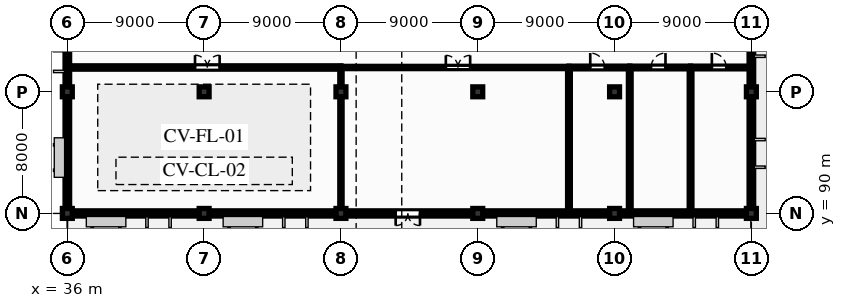
"""IFC4 building model, lengths in metres.
Left out: names, types, materials, properties, quantities, classifications, styles, units other than length and angle.
Written with IfcOpenShell. Run it as: python <this file> out.ifc"""

import sys

from ifc_helpers import new_model, si_unit, direction, frame, frame_2d, origin, origin_2d, place, context, subcontext, project, spatial, rectangle, extrude, element, fill, save


model = new_model("IFC4")
c1 = context("Model", 3, precision=1e-05, world=origin(), true_north=direction((0.0, 1.0)))
c2 = subcontext(c1, "Body", "Model", "MODEL_VIEW")
j1 = project(units=[si_unit("LENGTHUNIT", "METRE"), si_unit("PLANEANGLEUNIT", "RADIAN")], contexts=[c1])
p1 = place(None, origin())
s1 = spatial("IfcSite", under=j1, at=p1, CompositionType="ELEMENT")
p2 = place(p1, origin())
s2 = spatial("IfcBuilding", under=s1, at=p2, CompositionType="ELEMENT")
p3 = place(p2, frame((0.0, 0.0, 16.52)))
s3 = spatial("IfcBuildingStorey", under=s2, at=p3, CompositionType="ELEMENT", Elevation=16.52)
for number, where, z_axis, x_axis in (
    (1, (36.0, 90.0, 0.0), (0.0, 0.0, 1.0), (1.0, 0.0, 0.0)),
    (2, (36.0, 98.0, 0.0), (0.0, 0.0, 1.0), (1.0, 0.0, 0.0)),
    (3, (45.0, 90.0, 0.0), (0.0, 0.0, 1.0), (1.0, 0.0, 0.0)),
    (4, (45.0, 98.0, 0.0), (0.0, 0.0, 1.0), (1.0, 0.0, 0.0)),
    (5, (54.0, 90.0, 0.0), (0.0, 0.0, 1.0), (1.0, 0.0, 0.0)),
    (6, (54.0, 98.0, 0.0), (0.0, 0.0, 1.0), (1.0, 0.0, 0.0)),
    (7, (63.0, 90.0, 0.0), (0.0, 0.0, 1.0), (1.0, 0.0, 0.0)),
    (8, (63.0, 98.0, 0.0), (0.0, 0.0, 1.0), (1.0, 0.0, 0.0)),
    (9, (72.0, 90.0, 0.0), (0.0, 0.0, 1.0), (1.0, 0.0, 0.0)),
    (10, (72.0, 98.0, 0.0), (0.0, 0.0, 1.0), (1.0, 0.0, 0.0)),
    (11, (81.0, 90.0, 0.0), (0.0, 0.0, 1.0), (1.0, 0.0, 0.0)),
    (12, (81.0, 98.0, 0.0), (0.0, 0.0, 1.0), (1.0, 0.0, 0.0)),
):
    element("IfcColumn", number, at=place(p3, frame(where, z_axis=z_axis, x_axis=x_axis)), inside=s3, PredefinedType="COLUMN", context=c2, shape_type="SweptSolid", body=[
        extrude(rectangle(XDim=0.65, YDim=0.65, at=origin_2d()), origin(), (0.0, 0.0, 1.0), 3.74),
    ])
p4 = place(p3, frame((36.0, 90.0, 0.0), z_axis=(0.0, 0.0, 1.0), x_axis=(1.0, 0.0, 0.0)))
e13 = element("IfcWall", 13, at=p4, inside=s3, PredefinedType="SOLIDWALL", context=c2, shape_type="SweptSolid", body=[
    extrude(rectangle(XDim=9.0, YDim=0.34, at=frame_2d((4.5, 0.0))), origin(), (0.0, 0.0, 1.0), 3.46),
])
p5 = place(p4, frame((1.8, 0.0, 0.645)))
e14 = element("IfcOpeningElement", 14, at=p5, cuts=e13, PredefinedType="OPENING", context=c2, shape_type="SweptSolid", body=[
    extrude(rectangle(XDim=1.5, YDim=2.1, at=frame_2d((0.75, 1.05))), frame((0.0, 0.18, 0.0), z_axis=(0.0, -1.0, 0.0), x_axis=(1.0, 0.0, 0.0)), (0.0, 0.0, 1.0), 0.36),
])
p6 = place(p4, frame((5.4, 0.0, 0.645)))
e15 = element("IfcOpeningElement", 15, at=p6, cuts=e13, PredefinedType="OPENING", context=c2, shape_type="SweptSolid", body=[
    extrude(rectangle(XDim=1.2, YDim=2.1, at=frame_2d((0.6, 1.05))), frame((0.0, 0.18, 0.0), z_axis=(0.0, -1.0, 0.0), x_axis=(1.0, 0.0, 0.0)), (0.0, 0.0, 1.0), 0.36),
])
p7 = place(p3, frame((45.0, 90.0, 0.0), z_axis=(0.0, 0.0, 1.0), x_axis=(1.0, 0.0, 0.0)))
e16 = element("IfcWall", 16, at=p7, inside=s3, PredefinedType="SOLIDWALL", context=c2, shape_type="SweptSolid", body=[
    extrude(rectangle(XDim=9.0, YDim=0.34, at=frame_2d((4.5, 0.0))), origin(), (0.0, 0.0, 1.0), 3.46),
])
p8 = place(p7, frame((1.8, 0.0, 0.61)))
e17 = element("IfcOpeningElement", 17, at=p8, cuts=e16, PredefinedType="OPENING", context=c2, shape_type="SweptSolid", body=[
    extrude(rectangle(XDim=1.5, YDim=2.1, at=frame_2d((0.75, 1.05))), frame((0.0, 0.18, 0.0), z_axis=(0.0, -1.0, 0.0), x_axis=(1.0, 0.0, 0.0)), (0.0, 0.0, 1.0), 0.36),
])
p9 = place(p7, frame((5.4, 0.0, 0.61)))
e18 = element("IfcOpeningElement", 18, at=p9, cuts=e16, PredefinedType="OPENING", context=c2, shape_type="SweptSolid", body=[
    extrude(rectangle(XDim=1.2, YDim=2.1, at=frame_2d((0.6, 1.05))), frame((0.0, 0.18, 0.0), z_axis=(0.0, -1.0, 0.0), x_axis=(1.0, 0.0, 0.0)), (0.0, 0.0, 1.0), 0.36),
])
p10 = place(p3, frame((54.0, 90.0, 0.0), z_axis=(0.0, 0.0, 1.0), x_axis=(1.0, 0.0, 0.0)))
e19 = element("IfcWall", 19, at=p10, inside=s3, PredefinedType="SOLIDWALL", context=c2, shape_type="SweptSolid", body=[
    extrude(rectangle(XDim=9.0, YDim=0.34, at=frame_2d((4.5, 0.0))), origin(), (0.0, 0.0, 1.0), 3.46),
])
p11 = place(p10, frame((3.6, 0.0, 0.0)))
e20 = element("IfcOpeningElement", 20, at=p11, cuts=e19, PredefinedType="OPENING", context=c2, shape_type="SweptSolid", body=[
    extrude(rectangle(XDim=1.6, YDim=2.25, at=frame_2d((0.8, 1.125))), frame((0.0, 0.18, 0.0), z_axis=(0.0, -1.0, 0.0), x_axis=(1.0, 0.0, 0.0)), (0.0, 0.0, 1.0), 0.36),
])
p12 = place(p3, frame((63.0, 90.0, 0.0), z_axis=(0.0, 0.0, 1.0), x_axis=(1.0, 0.0, 0.0)))
e21 = element("IfcWall", 21, at=p12, inside=s3, PredefinedType="SOLIDWALL", context=c2, shape_type="SweptSolid", body=[
    extrude(rectangle(XDim=9.0, YDim=0.34, at=frame_2d((4.5, 0.0))), origin(), (0.0, 0.0, 1.0), 3.46),
])
p13 = place(p12, frame((1.8, 0.0, 0.61)))
e22 = element("IfcOpeningElement", 22, at=p13, cuts=e21, PredefinedType="OPENING", context=c2, shape_type="SweptSolid", body=[
    extrude(rectangle(XDim=1.5, YDim=2.1, at=frame_2d((0.75, 1.05))), frame((0.0, 0.18, 0.0), z_axis=(0.0, -1.0, 0.0), x_axis=(1.0, 0.0, 0.0)), (0.0, 0.0, 1.0), 0.36),
])
p14 = place(p3, frame((72.0, 90.0, 0.0), z_axis=(0.0, 0.0, 1.0), x_axis=(1.0, 0.0, 0.0)))
e23 = element("IfcWall", 23, at=p14, inside=s3, PredefinedType="SOLIDWALL", context=c2, shape_type="SweptSolid", body=[
    extrude(rectangle(XDim=9.0, YDim=0.34, at=frame_2d((4.5, 0.0))), origin(), (0.0, 0.0, 1.0), 3.46),
])
p15 = place(p14, frame((1.8, 0.0, 0.61)))
e24 = element("IfcOpeningElement", 24, at=p15, cuts=e23, PredefinedType="OPENING", context=c2, shape_type="SweptSolid", body=[
    extrude(rectangle(XDim=1.5, YDim=2.1, at=frame_2d((0.75, 1.05))), frame((0.0, 0.18, 0.0), z_axis=(0.0, -1.0, 0.0), x_axis=(1.0, 0.0, 0.0)), (0.0, 0.0, 1.0), 0.36),
])
p16 = place(p14, frame((5.4, 0.0, 0.61)))
e25 = element("IfcOpeningElement", 25, at=p16, cuts=e23, PredefinedType="OPENING", context=c2, shape_type="SweptSolid", body=[
    extrude(rectangle(XDim=1.2, YDim=2.1, at=frame_2d((0.6, 1.05))), frame((0.0, 0.18, 0.0), z_axis=(0.0, -1.0, 0.0), x_axis=(1.0, 0.0, 0.0)), (0.0, 0.0, 1.0), 0.36),
])
p17 = place(p3, frame((36.0, 90.0, 0.0), z_axis=(0.0, 0.0, 1.0), x_axis=(0.0, 1.0, 0.0)))
e26 = element("IfcWall", 26, at=p17, inside=s3, PredefinedType="SOLIDWALL", context=c2, shape_type="SweptSolid", body=[
    extrude(rectangle(XDim=24.0, YDim=0.3, at=frame_2d((12.0, 0.0))), origin(), (0.0, 0.0, 1.0), 2.785),
])
p18 = place(p17, frame((3.0, 0.0, 0.815)))
e27 = element("IfcOpeningElement", 27, at=p18, cuts=e26, PredefinedType="OPENING", context=c2, shape_type="SweptSolid", body=[
    extrude(rectangle(XDim=1.35, YDim=1.85, at=frame_2d((0.675, 0.925))), frame((0.0, 0.16, 0.0), z_axis=(0.0, -1.0, 0.0), x_axis=(1.0, 0.0, 0.0)), (0.0, 0.0, 1.0), 0.32),
])
p19 = place(p17, frame((11.7, 0.0, 0.915)))
e28 = element("IfcOpeningElement", 28, at=p19, cuts=e26, PredefinedType="OPENING", context=c2, shape_type="SweptSolid", body=[
    extrude(rectangle(XDim=1.05, YDim=1.75, at=frame_2d((0.525, 0.875))), frame((0.0, 0.16, 0.0), z_axis=(0.0, -1.0, 0.0), x_axis=(1.0, 0.0, 0.0)), (0.0, 0.0, 1.0), 0.32),
])
p20 = place(p17, frame((16.5, 0.0, 0.565)))
e29 = element("IfcOpeningElement", 29, at=p20, cuts=e26, PredefinedType="OPENING", context=c2, shape_type="SweptSolid", body=[
    extrude(rectangle(XDim=1.5, YDim=2.1, at=frame_2d((0.75, 1.05))), frame((0.0, 0.16, 0.0), z_axis=(0.0, -1.0, 0.0), x_axis=(1.0, 0.0, 0.0)), (0.0, 0.0, 1.0), 0.32),
])
p21 = place(p3, frame((81.0, 90.0, 0.0), z_axis=(0.0, 0.0, 1.0), x_axis=(0.0, 1.0, 0.0)))
e30 = element("IfcWall", 30, at=p21, inside=s3, PredefinedType="SOLIDWALL", context=c2, shape_type="SweptSolid", body=[
    extrude(rectangle(XDim=24.0, YDim=0.3, at=frame_2d((12.0, 0.0))), origin(), (0.0, 0.0, 1.0), 2.65),
])
p22 = place(p21, frame((3.2, 0.0, 0.43)))
e31 = element("IfcOpeningElement", 31, at=p22, cuts=e30, PredefinedType="OPENING", context=c2, shape_type="SweptSolid", body=[
    extrude(rectangle(XDim=1.5, YDim=2.1, at=frame_2d((0.75, 1.05))), frame((0.0, 0.16, 0.0), z_axis=(0.0, -1.0, 0.0), x_axis=(1.0, 0.0, 0.0)), (0.0, 0.0, 1.0), 0.32),
])
p23 = place(p21, frame((10.5, 0.0, 0.68)))
e32 = element("IfcOpeningElement", 32, at=p23, cuts=e30, PredefinedType="OPENING", context=c2, shape_type="SweptSolid", body=[
    extrude(rectangle(XDim=1.35, YDim=1.85, at=frame_2d((0.675, 0.925))), frame((0.0, 0.16, 0.0), z_axis=(0.0, -1.0, 0.0), x_axis=(1.0, 0.0, 0.0)), (0.0, 0.0, 1.0), 0.32),
])
p24 = place(p3, frame((36.0, 99.6, 0.0), z_axis=(0.0, 0.0, 1.0), x_axis=(1.0, 0.0, 0.0)))
e33 = element("IfcWall", 33, at=p24, inside=s3, PredefinedType="PARTITIONING", context=c2, shape_type="SweptSolid", body=[
    extrude(rectangle(XDim=18.0, YDim=0.22, at=frame_2d((9.0, 0.0))), origin(), (0.0, 0.0, 1.0), 2.65),
])
p25 = place(p24, frame((8.4, 0.0, 0.0)))
e34 = element("IfcOpeningElement", 34, at=p25, cuts=e33, PredefinedType="OPENING", context=c2, shape_type="SweptSolid", body=[
    extrude(rectangle(XDim=1.62, YDim=2.22, at=frame_2d((0.81, 1.11))), frame((0.0, 0.12, 0.0), z_axis=(0.0, -1.0, 0.0), x_axis=(1.0, 0.0, 0.0)), (0.0, 0.0, 1.0), 0.24),
])
p26 = place(p3, frame((54.0, 99.6, 0.0), z_axis=(0.0, 0.0, 1.0), x_axis=(1.0, 0.0, 0.0)))
e35 = element("IfcWall", 35, at=p26, inside=s3, PredefinedType="PARTITIONING", context=c2, shape_type="SweptSolid", body=[
    extrude(rectangle(XDim=15.0, YDim=0.15, at=frame_2d((7.5, 0.0))), origin(), (0.0, 0.0, 1.0), 3.46),
])
p27 = place(p26, frame((6.9, 0.0, 0.0)))
e36 = element("IfcOpeningElement", 36, at=p27, cuts=e35, PredefinedType="OPENING", context=c2, shape_type="SweptSolid", body=[
    extrude(rectangle(XDim=1.6, YDim=2.2, at=frame_2d((0.8, 1.1))), frame((0.0, 0.085, 0.0), z_axis=(0.0, -1.0, 0.0), x_axis=(1.0, 0.0, 0.0)), (0.0, 0.0, 1.0), 0.17),
])
p28 = place(p3, frame((54.0, 90.0, 0.0), z_axis=(0.0, 0.0, 1.0), x_axis=(0.0, 1.0, 0.0)))
e37 = element("IfcWall", 37, at=p28, inside=s3, PredefinedType="PARTITIONING", context=c2, shape_type="SweptSolid", body=[
    extrude(rectangle(XDim=9.6, YDim=0.15, at=frame_2d((4.8, 0.0))), origin(), (0.0, 0.0, 1.0), 2.65),
])
p29 = place(p3, frame((69.0, 99.6, 0.0), z_axis=(0.0, 0.0, 1.0), x_axis=(1.0, 0.0, 0.0)))
e38 = element("IfcWall", 38, at=p29, inside=s3, PredefinedType="PLUMBINGWALL", context=c2, shape_type="SweptSolid", body=[
    extrude(rectangle(XDim=4.0, YDim=0.18, at=frame_2d((2.0, 0.0))), origin(), (0.0, 0.0, 1.0), 3.46),
])
p30 = place(p29, frame((1.4, 0.0, 0.0)))
e39 = element("IfcOpeningElement", 39, at=p30, cuts=e38, PredefinedType="OPENING", context=c2, shape_type="SweptSolid", body=[
    extrude(rectangle(XDim=0.95, YDim=2.15, at=frame_2d((0.475, 1.075))), frame((0.0, 0.1, 0.0), z_axis=(0.0, -1.0, 0.0), x_axis=(1.0, 0.0, 0.0)), (0.0, 0.0, 1.0), 0.2),
])
p31 = place(p3, frame((69.0, 90.0, 0.0), z_axis=(0.0, 0.0, 1.0), x_axis=(0.0, 1.0, 0.0)))
e40 = element("IfcWall", 40, at=p31, inside=s3, PredefinedType="PLUMBINGWALL", context=c2, shape_type="SweptSolid", body=[
    extrude(rectangle(XDim=9.6, YDim=0.18, at=frame_2d((4.8, 0.0))), origin(), (0.0, 0.0, 1.0), 3.46),
])
p32 = place(p3, frame((73.0, 99.6, 0.0), z_axis=(0.0, 0.0, 1.0), x_axis=(1.0, 0.0, 0.0)))
e41 = element("IfcWall", 41, at=p32, inside=s3, PredefinedType="PLUMBINGWALL", context=c2, shape_type="SweptSolid", body=[
    extrude(rectangle(XDim=4.0, YDim=0.18, at=frame_2d((2.0, 0.0))), origin(), (0.0, 0.0, 1.0), 3.46),
])
p33 = place(p32, frame((1.4, 0.0, 0.0)))
e42 = element("IfcOpeningElement", 42, at=p33, cuts=e41, PredefinedType="OPENING", context=c2, shape_type="SweptSolid", body=[
    extrude(rectangle(XDim=0.95, YDim=2.15, at=frame_2d((0.475, 1.075))), frame((0.0, 0.1, 0.0), z_axis=(0.0, -1.0, 0.0), x_axis=(1.0, 0.0, 0.0)), (0.0, 0.0, 1.0), 0.2),
])
p34 = place(p3, frame((73.0, 90.0, 0.0), z_axis=(0.0, 0.0, 1.0), x_axis=(0.0, 1.0, 0.0)))
e43 = element("IfcWall", 43, at=p34, inside=s3, PredefinedType="PLUMBINGWALL", context=c2, shape_type="SweptSolid", body=[
    extrude(rectangle(XDim=9.6, YDim=0.18, at=frame_2d((4.8, 0.0))), origin(), (0.0, 0.0, 1.0), 3.46),
])
p35 = place(p3, frame((77.0, 99.6, 0.0), z_axis=(0.0, 0.0, 1.0), x_axis=(1.0, 0.0, 0.0)))
e44 = element("IfcWall", 44, at=p35, inside=s3, PredefinedType="PLUMBINGWALL", context=c2, shape_type="SweptSolid", body=[
    extrude(rectangle(XDim=4.0, YDim=0.18, at=frame_2d((2.0, 0.0))), origin(), (0.0, 0.0, 1.0), 3.46),
])
p36 = place(p35, frame((1.4, 0.0, 0.0)))
e45 = element("IfcOpeningElement", 45, at=p36, cuts=e44, PredefinedType="OPENING", context=c2, shape_type="SweptSolid", body=[
    extrude(rectangle(XDim=0.95, YDim=2.15, at=frame_2d((0.475, 1.075))), frame((0.0, 0.1, 0.0), z_axis=(0.0, -1.0, 0.0), x_axis=(1.0, 0.0, 0.0)), (0.0, 0.0, 1.0), 0.2),
])
p37 = place(p3, frame((77.0, 90.0, 0.0), z_axis=(0.0, 0.0, 1.0), x_axis=(0.0, 1.0, 0.0)))
e46 = element("IfcWall", 46, at=p37, inside=s3, PredefinedType="PLUMBINGWALL", context=c2, shape_type="SweptSolid", body=[
    extrude(rectangle(XDim=9.6, YDim=0.18, at=frame_2d((4.8, 0.0))), origin(), (0.0, 0.0, 1.0), 3.46),
])
p38 = place(p5, origin())
e47 = element("IfcWindow", 47, at=p38, inside=s3, PartitioningType="SINGLE_PANEL", PredefinedType="WINDOW", context=c2, shape_type="SweptSolid", body=[
    extrude(rectangle(XDim=1.5, YDim=2.1, at=frame_2d((0.75, 1.05))), frame((0.0, 0.03, 0.0), z_axis=(0.0, -1.0, 0.0), x_axis=(1.0, 0.0, 0.0)), (0.0, 0.0, 1.0), 0.06),
])
fill(e14, e47)
p39 = place(p6, origin())
e48 = element("IfcWindow", 48, at=p39, inside=s3, PartitioningType="SINGLE_PANEL", PredefinedType="WINDOW", context=c2, shape_type="SweptSolid", body=[
    extrude(rectangle(XDim=1.2, YDim=2.1, at=frame_2d((0.6, 1.05))), frame((0.0, 0.03, 0.0), z_axis=(0.0, -1.0, 0.0), x_axis=(1.0, 0.0, 0.0)), (0.0, 0.0, 1.0), 0.06),
])
fill(e15, e48)
p40 = place(p8, origin())
e49 = element("IfcWindow", 49, at=p40, inside=s3, PartitioningType="SINGLE_PANEL", PredefinedType="WINDOW", context=c2, shape_type="SweptSolid", body=[
    extrude(rectangle(XDim=1.5, YDim=2.1, at=frame_2d((0.75, 1.05))), frame((0.0, 0.03, 0.0), z_axis=(0.0, -1.0, 0.0), x_axis=(1.0, 0.0, 0.0)), (0.0, 0.0, 1.0), 0.06),
])
fill(e17, e49)
p41 = place(p9, origin())
e50 = element("IfcWindow", 50, at=p41, inside=s3, PartitioningType="SINGLE_PANEL", PredefinedType="WINDOW", context=c2, shape_type="SweptSolid", body=[
    extrude(rectangle(XDim=1.2, YDim=2.1, at=frame_2d((0.6, 1.05))), frame((0.0, 0.03, 0.0), z_axis=(0.0, -1.0, 0.0), x_axis=(1.0, 0.0, 0.0)), (0.0, 0.0, 1.0), 0.06),
])
fill(e18, e50)
p42 = place(p11, frame((1.6, 0.0, 0.0), z_axis=(0.0, 0.0, 1.0), x_axis=(-1.0, 0.0, 0.0)))
e51 = element("IfcDoor", 51, at=p42, inside=s3, OperationType="DOUBLE_DOOR_SINGLE_SWING", PredefinedType="DOOR", context=c2, shape_type="SweptSolid", body=[
    extrude(rectangle(XDim=1.6, YDim=2.25, at=frame_2d((0.8, 1.125))), frame((0.0, 0.025, 0.0), z_axis=(0.0, -1.0, 0.0), x_axis=(1.0, 0.0, 0.0)), (0.0, 0.0, 1.0), 0.05),
])
fill(e20, e51)
p43 = place(p13, origin())
e52 = element("IfcWindow", 52, at=p43, inside=s3, PartitioningType="SINGLE_PANEL", PredefinedType="WINDOW", context=c2, shape_type="SweptSolid", body=[
    extrude(rectangle(XDim=1.5, YDim=2.1, at=frame_2d((0.75, 1.05))), frame((0.0, 0.03, 0.0), z_axis=(0.0, -1.0, 0.0), x_axis=(1.0, 0.0, 0.0)), (0.0, 0.0, 1.0), 0.06),
])
fill(e22, e52)
p44 = place(p15, origin())
e53 = element("IfcWindow", 53, at=p44, inside=s3, PartitioningType="SINGLE_PANEL", PredefinedType="WINDOW", context=c2, shape_type="SweptSolid", body=[
    extrude(rectangle(XDim=1.5, YDim=2.1, at=frame_2d((0.75, 1.05))), frame((0.0, 0.03, 0.0), z_axis=(0.0, -1.0, 0.0), x_axis=(1.0, 0.0, 0.0)), (0.0, 0.0, 1.0), 0.06),
])
fill(e24, e53)
p45 = place(p16, origin())
e54 = element("IfcWindow", 54, at=p45, inside=s3, PartitioningType="SINGLE_PANEL", PredefinedType="WINDOW", context=c2, shape_type="SweptSolid", body=[
    extrude(rectangle(XDim=1.2, YDim=2.1, at=frame_2d((0.6, 1.05))), frame((0.0, 0.03, 0.0), z_axis=(0.0, -1.0, 0.0), x_axis=(1.0, 0.0, 0.0)), (0.0, 0.0, 1.0), 0.06),
])
fill(e25, e54)
p46 = place(p18, origin())
e55 = element("IfcWindow", 55, at=p46, inside=s3, PartitioningType="SINGLE_PANEL", PredefinedType="WINDOW", context=c2, shape_type="SweptSolid", body=[
    extrude(rectangle(XDim=1.35, YDim=1.85, at=frame_2d((0.675, 0.925))), frame((0.0, 0.03, 0.0), z_axis=(0.0, -1.0, 0.0), x_axis=(1.0, 0.0, 0.0)), (0.0, 0.0, 1.0), 0.06),
])
fill(e27, e55)
p47 = place(p22, origin())
e56 = element("IfcWindow", 56, at=p47, inside=s3, PartitioningType="SINGLE_PANEL", PredefinedType="WINDOW", context=c2, shape_type="SweptSolid", body=[
    extrude(rectangle(XDim=1.5, YDim=2.1, at=frame_2d((0.75, 1.05))), frame((0.0, 0.03, 0.0), z_axis=(0.0, -1.0, 0.0), x_axis=(1.0, 0.0, 0.0)), (0.0, 0.0, 1.0), 0.06),
])
fill(e31, e56)
p48 = place(p23, origin())
e57 = element("IfcWindow", 57, at=p48, inside=s3, PartitioningType="SINGLE_PANEL", PredefinedType="WINDOW", context=c2, shape_type="SweptSolid", body=[
    extrude(rectangle(XDim=1.35, YDim=1.85, at=frame_2d((0.675, 0.925))), frame((0.0, 0.03, 0.0), z_axis=(0.0, -1.0, 0.0), x_axis=(1.0, 0.0, 0.0)), (0.0, 0.0, 1.0), 0.06),
])
fill(e32, e57)
p49 = place(p25, origin())
e58 = element("IfcDoor", 58, at=p49, inside=s3, OperationType="DOUBLE_DOOR_SINGLE_SWING", PredefinedType="DOOR", context=c2, shape_type="SweptSolid", body=[
    extrude(rectangle(XDim=1.62, YDim=2.22, at=frame_2d((0.81, 1.11))), frame((0.0, 0.025, 0.0), z_axis=(0.0, -1.0, 0.0), x_axis=(1.0, 0.0, 0.0)), (0.0, 0.0, 1.0), 0.05),
])
fill(e34, e58)
p50 = place(p27, origin())
e59 = element("IfcDoor", 59, at=p50, inside=s3, OperationType="DOUBLE_DOOR_SINGLE_SWING", PredefinedType="DOOR", context=c2, shape_type="SweptSolid", body=[
    extrude(rectangle(XDim=1.6, YDim=2.2, at=frame_2d((0.8, 1.1))), frame((0.0, 0.025, 0.0), z_axis=(0.0, -1.0, 0.0), x_axis=(1.0, 0.0, 0.0)), (0.0, 0.0, 1.0), 0.05),
])
fill(e36, e59)
p51 = place(p30, origin())
e60 = element("IfcDoor", 60, at=p51, inside=s3, OperationType="SINGLE_SWING_LEFT", PredefinedType="DOOR", context=c2, shape_type="SweptSolid", body=[
    extrude(rectangle(XDim=0.95, YDim=2.15, at=frame_2d((0.475, 1.075))), frame((0.0, 0.025, 0.0), z_axis=(0.0, -1.0, 0.0), x_axis=(1.0, 0.0, 0.0)), (0.0, 0.0, 1.0), 0.05),
])
fill(e39, e60)
p52 = place(p33, origin())
e61 = element("IfcDoor", 61, at=p52, inside=s3, OperationType="SINGLE_SWING_RIGHT", PredefinedType="DOOR", context=c2, shape_type="SweptSolid", body=[
    extrude(rectangle(XDim=0.95, YDim=2.15, at=frame_2d((0.475, 1.075))), frame((0.0, 0.025, 0.0), z_axis=(0.0, -1.0, 0.0), x_axis=(1.0, 0.0, 0.0)), (0.0, 0.0, 1.0), 0.05),
])
fill(e42, e61)
p53 = place(p36, origin())
e62 = element("IfcDoor", 62, at=p53, inside=s3, OperationType="SINGLE_SWING_LEFT", PredefinedType="DOOR", context=c2, shape_type="SweptSolid", body=[
    extrude(rectangle(XDim=0.95, YDim=2.15, at=frame_2d((0.475, 1.075))), frame((0.0, 0.025, 0.0), z_axis=(0.0, -1.0, 0.0), x_axis=(1.0, 0.0, 0.0)), (0.0, 0.0, 1.0), 0.05),
])
fill(e45, e62)
save(model, sys.argv[1])
